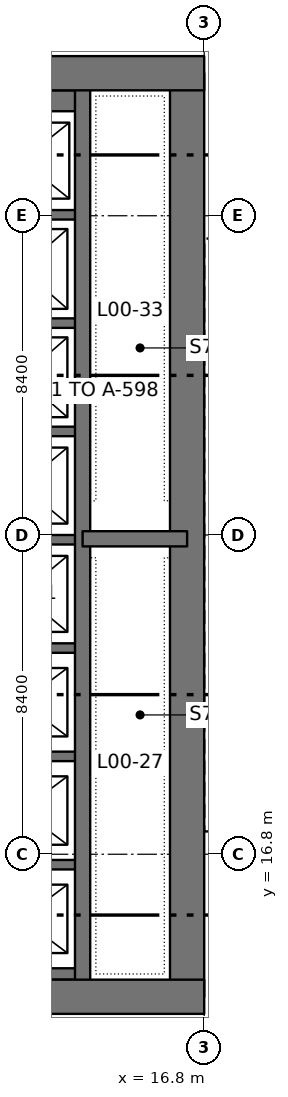
"""IFC4 building model, lengths in metres.
Left out: names, types, materials, properties, quantities, classifications, styles, units other than length and angle.
Written with IfcOpenShell. Run it as: python <this file> out.ifc"""

import sys

from ifc_helpers import new_model, si_unit, direction, frame, frame_2d, origin, place, context, subcontext, project, spatial, rectangle, extrude, element, save


model = new_model("IFC4")
c1 = context("Model", 3, precision=1e-05, world=origin(), true_north=direction((0.0, 1.0)))
c2 = subcontext(c1, "Body", "Model", "MODEL_VIEW")
j1 = project(units=[si_unit("LENGTHUNIT", "METRE"), si_unit("PLANEANGLEUNIT", "RADIAN")], contexts=[c1])
p1 = place(None, origin())
s1 = spatial("IfcSite", under=j1, at=p1, CompositionType="ELEMENT")
p2 = place(p1, origin())
s2 = spatial("IfcBuilding", under=s1, at=p2, CompositionType="ELEMENT")
p3 = place(p2, origin())
s3 = spatial("IfcBuildingStorey", under=s2, at=p3, CompositionType="ELEMENT", Elevation=0.0)
p4 = place(p3, frame((-1.2, 13.05, 0.0), z_axis=(0.0, 0.0, 1.0), x_axis=(1.0, 0.0, 0.0)))
e1 = element("IfcWall", 1, at=p4, inside=s3, PredefinedType="SHEAR", context=c2, shape_type="SweptSolid", body=[
    extrude(rectangle(XDim=18.0, YDim=0.9, at=frame_2d((9.0, 0.0))), origin(), (0.0, 0.0, 1.0), 5.4),
])
p5 = place(p4, frame((8.95, 0.0, 0.0)))
e2 = element("IfcOpeningElement", 2, at=p5, cuts=e1, PredefinedType="OPENING", context=c2, shape_type="SweptSolid", body=[
    extrude(rectangle(XDim=1.8, YDim=2.4, at=frame_2d((0.9, 1.2))), frame((0.0, 0.46, 0.0), z_axis=(0.0, -1.0, 0.0), x_axis=(1.0, 0.0, 0.0)), (0.0, 0.0, 1.0), 0.92),
])
p6 = place(p3, frame((-1.2, 37.35, 0.0), z_axis=(0.0, 0.0, 1.0), x_axis=(1.0, 0.0, 0.0)))
e3 = element("IfcWall", 3, at=p6, inside=s3, PredefinedType="SHEAR", context=c2, shape_type="SweptSolid", body=[
    extrude(rectangle(XDim=18.0, YDim=0.9, at=frame_2d((9.0, 0.0))), origin(), (0.0, 0.0, 1.0), 5.4),
])
p7 = place(p6, frame((8.95, 0.0, 0.0)))
e4 = element("IfcOpeningElement", 4, at=p7, cuts=e3, PredefinedType="OPENING", context=c2, shape_type="SweptSolid", body=[
    extrude(rectangle(XDim=1.8, YDim=2.4, at=frame_2d((0.9, 1.2))), frame((0.0, 0.46, 0.0), z_axis=(0.0, -1.0, 0.0), x_axis=(1.0, 0.0, 0.0)), (0.0, 0.0, 1.0), 0.92),
])
p8 = place(p3, frame((16.35, 13.05, 0.0), z_axis=(0.0, 0.0, 1.0), x_axis=(0.0, 1.0, 0.0)))
e5 = element("IfcWall", 5, at=p8, inside=s3, PredefinedType="SHEAR", context=c2, shape_type="SweptSolid", body=[
    extrude(rectangle(XDim=24.3, YDim=0.9, at=frame_2d((12.15, 0.0))), origin(), (0.0, 0.0, 1.0), 5.4),
])
p9 = place(p3, frame((13.6, 13.05, 0.0), z_axis=(0.0, 0.0, 1.0), x_axis=(0.0, 1.0, 0.0)))
e6 = element("IfcWall", 6, at=p9, inside=s3, PredefinedType="SHEAR", context=c2, shape_type="SweptSolid", body=[
    extrude(rectangle(XDim=24.3, YDim=0.4, at=frame_2d((12.15, 0.0))), origin(), (0.0, 0.0, 1.0), 5.4),
])
p10 = place(p3, frame((13.6, 25.1, 0.0), z_axis=(0.0, 0.0, 1.0), x_axis=(1.0, 0.0, 0.0)))
e7 = element("IfcWall", 7, at=p10, inside=s3, PredefinedType="SHEAR", context=c2, shape_type="SweptSolid", body=[
    extrude(rectangle(XDim=2.75, YDim=0.4, at=frame_2d((1.375, 0.0))), origin(), (0.0, 0.0, 1.0), 5.4),
])
p11 = place(p3, frame((10.4, 13.65, 0.0), z_axis=(0.0, 0.0, 1.0), x_axis=(1.0, 0.0, 0.0)))
e8 = element("IfcWall", 8, at=p11, inside=s3, PredefinedType="SHEAR", context=c2, shape_type="SweptSolid", body=[
    extrude(rectangle(XDim=3.2, YDim=0.3, at=frame_2d((1.6, 0.0))), origin(), (0.0, 0.0, 1.0), 5.4),
])
for number, where, z_axis, x_axis in (
    (9, (10.4, 16.525, 0.0), (0.0, 0.0, 1.0), (1.0, 0.0, 0.0)),
    (10, (10.4, 19.375, 0.0), (0.0, 0.0, 1.0), (1.0, 0.0, 0.0)),
    (11, (10.4, 22.225, 0.0), (0.0, 0.0, 1.0), (1.0, 0.0, 0.0)),
    (12, (10.4, 25.075, 0.0), (0.0, 0.0, 1.0), (1.0, 0.0, 0.0)),
    (13, (10.4, 27.925, 0.0), (0.0, 0.0, 1.0), (1.0, 0.0, 0.0)),
    (14, (10.4, 30.775, 0.0), (0.0, 0.0, 1.0), (1.0, 0.0, 0.0)),
    (15, (10.4, 33.625, 0.0), (0.0, 0.0, 1.0), (1.0, 0.0, 0.0)),
):
    element("IfcWall", number, at=place(p3, frame(where, z_axis=z_axis, x_axis=x_axis)), inside=s3, PredefinedType="SHEAR", context=c2, shape_type="SweptSolid", body=[
        extrude(rectangle(XDim=3.2, YDim=0.25, at=frame_2d((1.6, 0.0))), origin(), (0.0, 0.0, 1.0), 5.4),
    ])
p12 = place(p3, frame((10.4, 36.625, 0.0), z_axis=(0.0, 0.0, 1.0), x_axis=(1.0, 0.0, 0.0)))
e16 = element("IfcWall", 16, at=p12, inside=s3, PredefinedType="SHEAR", context=c2, shape_type="SweptSolid", body=[
    extrude(rectangle(XDim=3.2, YDim=0.55, at=frame_2d((1.6, 0.0))), origin(), (0.0, 0.0, 1.0), 5.4),
])
save(model, sys.argv[1])
